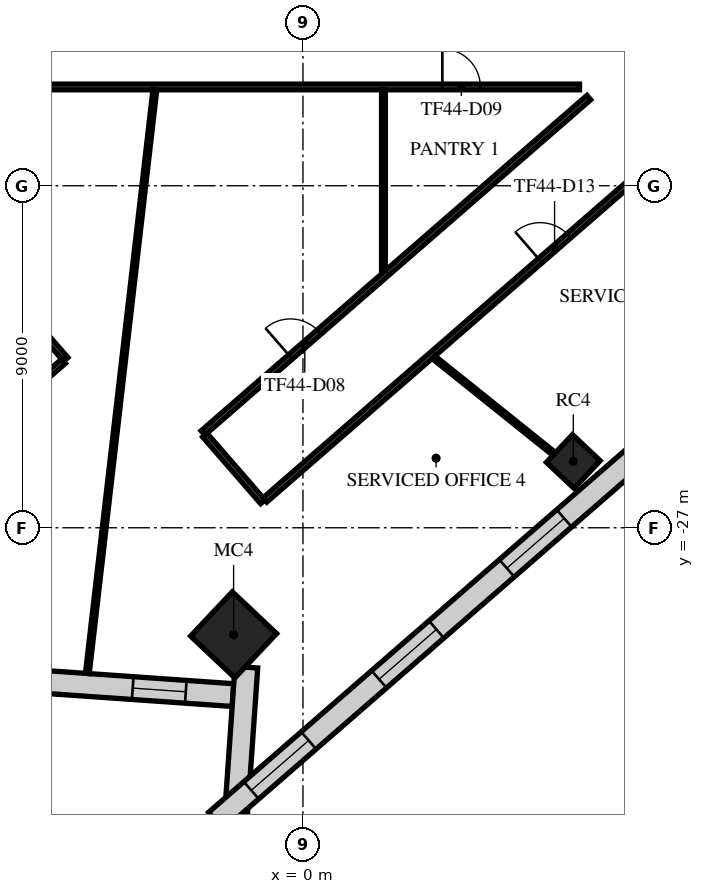
"""IFC4 building model, lengths in metres.
Left out: names, types, materials, properties, quantities, classifications, styles, units other than length and angle.
Written with IfcOpenShell. Run it as: python <this file> out.ifc"""

import sys

from ifc_helpers import new_model, si_unit, direction, frame, frame_2d, origin, origin_2d, place, context, subcontext, project, spatial, rectangle, extrude, element, fill, save


model = new_model("IFC4")
c1 = context("Model", 3, precision=1e-05, world=origin(), true_north=direction((0.0, 1.0)))
c2 = subcontext(c1, "Body", "Model", "MODEL_VIEW")
j1 = project(units=[si_unit("LENGTHUNIT", "METRE"), si_unit("PLANEANGLEUNIT", "RADIAN")], contexts=[c1])
p1 = place(None, origin())
s1 = spatial("IfcSite", under=j1, at=p1, CompositionType="ELEMENT")
p2 = place(p1, origin())
s2 = spatial("IfcBuilding", under=s1, at=p2, CompositionType="ELEMENT")
p3 = place(p2, frame((0.0, 0.0, 193.3)))
s3 = spatial("IfcBuildingStorey", under=s2, at=p3, CompositionType="ELEMENT", Elevation=193.3)
p4 = place(p3, frame((-1.825, -29.818, 0.0), z_axis=(0.0, 0.0, 1.0), x_axis=(0.685916152371, 0.727680583715, 0.0)))
e1 = element("IfcColumn", 1, at=p4, inside=s3, PredefinedType="COLUMN", context=c2, shape_type="SweptSolid", body=[
    extrude(rectangle(XDim=1.6, YDim=1.6, at=origin_2d()), origin(), (0.0, 0.0, 1.0), 4.0),
])
p5 = place(p3, frame((7.113, -25.257, 0.0), z_axis=(0.0, 0.0, 1.0), x_axis=(0.685916152371, 0.727680583715, 0.0)))
e2 = element("IfcColumn", 2, at=p5, inside=s3, PredefinedType="COLUMN", context=c2, shape_type="SweptSolid", body=[
    extrude(rectangle(XDim=1.0, YDim=1.0, at=origin_2d()), origin(), (0.0, 0.0, 1.0), 4.0),
])
p6 = place(p3, frame((-9.601, -30.861, 0.0), z_axis=(0.0, 0.0, 1.0), x_axis=(0.997564801601, -0.069745728239, 0.0)))
e3 = element("IfcWall", 3, at=p6, inside=s3, PredefinedType="STANDARD", context=c2, shape_type="SweptSolid", body=[
    extrude(rectangle(XDim=7.778, YDim=0.6, at=frame_2d((3.889, 0.0))), origin(), (0.0, 0.0, 1.0), 3.62),
])
p7 = place(p6, frame((1.244, 0.0, 0.9)))
e4 = element("IfcOpeningElement", 4, at=p7, cuts=e3, PredefinedType="OPENING", context=c2, shape_type="SweptSolid", body=[
    extrude(rectangle(XDim=1.4, YDim=2.1, at=frame_2d((0.7, 1.05))), frame((0.0, 0.31, 0.0), z_axis=(0.0, -1.0, 0.0), x_axis=(1.0, 0.0, 0.0)), (0.0, 0.0, 1.0), 0.62),
])
p8 = place(p6, frame((5.134, 0.0, 0.9)))
e5 = element("IfcOpeningElement", 5, at=p8, cuts=e3, PredefinedType="OPENING", context=c2, shape_type="SweptSolid", body=[
    extrude(rectangle(XDim=1.4, YDim=2.1, at=frame_2d((0.7, 1.05))), frame((0.0, 0.31, 0.0), z_axis=(0.0, -1.0, 0.0), x_axis=(1.0, 0.0, 0.0)), (0.0, 0.0, 1.0), 0.62),
])
p9 = place(p3, frame((-1.49, -30.669, 0.0), z_axis=(0.0, 0.0, 1.0), x_axis=(-0.069722992179, -0.997566390954, 0.0)))
e6 = element("IfcWall", 6, at=p9, inside=s3, PredefinedType="STANDARD", context=c2, shape_type="SweptSolid", body=[
    extrude(rectangle(XDim=4.303, YDim=0.6, at=frame_2d((2.152, 0.0))), origin(), (0.0, 0.0, 1.0), 3.62),
])
p10 = place(p3, frame((-2.286, -34.715, 0.0), z_axis=(0.0, 0.0, 1.0), x_axis=(0.754708272811, 0.656060532993, 0.0)))
e7 = element("IfcWall", 7, at=p10, inside=s3, PredefinedType="STANDARD", context=c2, shape_type="SweptSolid", body=[
    extrude(rectangle(XDim=49.0, YDim=0.6, at=frame_2d((24.5, 0.0))), origin(), (0.0, 0.0, 1.0), 3.62),
])
p11 = place(p10, frame((1.227, 0.0, 0.9)))
e8 = element("IfcOpeningElement", 8, at=p11, cuts=e7, PredefinedType="OPENING", context=c2, shape_type="SweptSolid", body=[
    extrude(rectangle(XDim=2.0, YDim=2.1, at=frame_2d((1.0, 1.05))), frame((0.0, 0.31, 0.0), z_axis=(0.0, -1.0, 0.0), x_axis=(1.0, 0.0, 0.0)), (0.0, 0.0, 1.0), 0.62),
])
p12 = place(p10, frame((5.682, 0.0, 0.9)))
e9 = element("IfcOpeningElement", 9, at=p12, cuts=e7, PredefinedType="OPENING", context=c2, shape_type="SweptSolid", body=[
    extrude(rectangle(XDim=2.0, YDim=2.1, at=frame_2d((1.0, 1.05))), frame((0.0, 0.31, 0.0), z_axis=(0.0, -1.0, 0.0), x_axis=(1.0, 0.0, 0.0)), (0.0, 0.0, 1.0), 0.62),
])
p13 = place(p10, frame((10.136, 0.0, 0.9)))
e10 = element("IfcOpeningElement", 10, at=p13, cuts=e7, PredefinedType="OPENING", context=c2, shape_type="SweptSolid", body=[
    extrude(rectangle(XDim=2.0, YDim=2.1, at=frame_2d((1.0, 1.05))), frame((0.0, 0.31, 0.0), z_axis=(0.0, -1.0, 0.0), x_axis=(1.0, 0.0, 0.0)), (0.0, 0.0, 1.0), 0.62),
])
p14 = place(p10, frame((14.591, 0.0, 0.9)))
e11 = element("IfcOpeningElement", 11, at=p14, cuts=e7, PredefinedType="OPENING", context=c2, shape_type="SweptSolid", body=[
    extrude(rectangle(XDim=2.0, YDim=2.1, at=frame_2d((1.0, 1.05))), frame((0.0, 0.31, 0.0), z_axis=(0.0, -1.0, 0.0), x_axis=(1.0, 0.0, 0.0)), (0.0, 0.0, 1.0), 0.62),
])
p15 = place(p10, frame((19.045, 0.0, 0.9)))
e12 = element("IfcOpeningElement", 12, at=p15, cuts=e7, PredefinedType="OPENING", context=c2, shape_type="SweptSolid", body=[
    extrude(rectangle(XDim=2.0, YDim=2.1, at=frame_2d((1.0, 1.05))), frame((0.0, 0.31, 0.0), z_axis=(0.0, -1.0, 0.0), x_axis=(1.0, 0.0, 0.0)), (0.0, 0.0, 1.0), 0.62),
])
p16 = place(p10, frame((23.5, 0.0, 0.9)))
e13 = element("IfcOpeningElement", 13, at=p16, cuts=e7, PredefinedType="OPENING", context=c2, shape_type="SweptSolid", body=[
    extrude(rectangle(XDim=2.0, YDim=2.1, at=frame_2d((1.0, 1.05))), frame((0.0, 0.31, 0.0), z_axis=(0.0, -1.0, 0.0), x_axis=(1.0, 0.0, 0.0)), (0.0, 0.0, 1.0), 0.62),
])
p17 = place(p10, frame((27.955, 0.0, 0.9)))
e14 = element("IfcOpeningElement", 14, at=p17, cuts=e7, PredefinedType="OPENING", context=c2, shape_type="SweptSolid", body=[
    extrude(rectangle(XDim=2.0, YDim=2.1, at=frame_2d((1.0, 1.05))), frame((0.0, 0.31, 0.0), z_axis=(0.0, -1.0, 0.0), x_axis=(1.0, 0.0, 0.0)), (0.0, 0.0, 1.0), 0.62),
])
p18 = place(p10, frame((32.409, 0.0, 0.9)))
e15 = element("IfcOpeningElement", 15, at=p18, cuts=e7, PredefinedType="OPENING", context=c2, shape_type="SweptSolid", body=[
    extrude(rectangle(XDim=2.0, YDim=2.1, at=frame_2d((1.0, 1.05))), frame((0.0, 0.31, 0.0), z_axis=(0.0, -1.0, 0.0), x_axis=(1.0, 0.0, 0.0)), (0.0, 0.0, 1.0), 0.62),
])
p19 = place(p10, frame((36.864, 0.0, 0.9)))
e16 = element("IfcOpeningElement", 16, at=p19, cuts=e7, PredefinedType="OPENING", context=c2, shape_type="SweptSolid", body=[
    extrude(rectangle(XDim=2.0, YDim=2.1, at=frame_2d((1.0, 1.05))), frame((0.0, 0.31, 0.0), z_axis=(0.0, -1.0, 0.0), x_axis=(1.0, 0.0, 0.0)), (0.0, 0.0, 1.0), 0.62),
])
p20 = place(p10, frame((41.318, 0.0, 0.9)))
e17 = element("IfcOpeningElement", 17, at=p20, cuts=e7, PredefinedType="OPENING", context=c2, shape_type="SweptSolid", body=[
    extrude(rectangle(XDim=2.0, YDim=2.1, at=frame_2d((1.0, 1.05))), frame((0.0, 0.31, 0.0), z_axis=(0.0, -1.0, 0.0), x_axis=(1.0, 0.0, 0.0)), (0.0, 0.0, 1.0), 0.62),
])
p21 = place(p10, frame((45.773, 0.0, 0.9)))
e18 = element("IfcOpeningElement", 18, at=p21, cuts=e7, PredefinedType="OPENING", context=c2, shape_type="SweptSolid", body=[
    extrude(rectangle(XDim=2.0, YDim=2.1, at=frame_2d((1.0, 1.05))), frame((0.0, 0.31, 0.0), z_axis=(0.0, -1.0, 0.0), x_axis=(1.0, 0.0, 0.0)), (0.0, 0.0, 1.0), 0.62),
])
p22 = place(p3, frame((-11.705, -16.285, 0.0), z_axis=(0.0, 0.0, 1.0), x_axis=(0.656018266208, -0.754745012837, 0.0)))
e19 = element("IfcWall", 19, at=p22, inside=s3, PredefinedType="PARTITIONING", context=c2, shape_type="SweptSolid", body=[
    extrude(rectangle(XDim=8.326, YDim=0.15, at=frame_2d((4.163, 0.0))), origin(), (0.0, 0.0, 1.0), 3.17),
])
p23 = place(p3, frame((-10.486, -15.4, 0.0), z_axis=(0.0, 0.0, 1.0), x_axis=(1.0, 0.0, 0.0)))
e20 = element("IfcWall", 20, at=p23, inside=s3, PredefinedType="PARTITIONING", context=c2, shape_type="SweptSolid", body=[
    extrude(rectangle(XDim=17.763, YDim=0.15, at=frame_2d((8.882, 0.0))), origin(), (0.0, 0.0, 1.0), 3.17),
])
p24 = place(p23, frame((14.154, 0.0, 0.0)))
e21 = element("IfcOpeningElement", 21, at=p24, cuts=e20, PredefinedType="OPENING", context=c2, shape_type="SweptSolid", body=[
    extrude(rectangle(XDim=1.0, YDim=2.1, at=frame_2d((0.5, 1.05))), frame((0.0, 0.085, 0.0), z_axis=(0.0, -1.0, 0.0), x_axis=(1.0, 0.0, 0.0)), (0.0, 0.0, 1.0), 0.17),
])
p25 = place(p3, frame((-7.997, -24.095, 0.0), z_axis=(0.0, 0.0, 1.0), x_axis=(0.754549456123, 0.656243185308, 0.0)))
e22 = element("IfcWall", 22, at=p25, inside=s3, PredefinedType="PARTITIONING", context=c2, shape_type="SweptSolid", body=[
    extrude(rectangle(XDim=2.25, YDim=0.15, at=frame_2d((1.125, 0.0))), origin(), (0.0, 0.0, 1.0), 3.17),
])
p26 = place(p3, frame((-2.631, -24.505, 0.0), z_axis=(0.0, 0.0, 1.0), x_axis=(0.754714526528, 0.656053338874, 0.0)))
e23 = element("IfcWall", 23, at=p26, inside=s3, PredefinedType="PARTITIONING", context=c2, shape_type="SweptSolid", body=[
    extrude(rectangle(XDim=13.452, YDim=0.15, at=frame_2d((6.726, 0.0))), origin(), (0.0, 0.0, 1.0), 3.17),
])
p27 = place(p26, frame((3.05, 0.0, 0.0)))
e24 = element("IfcOpeningElement", 24, at=p27, cuts=e23, PredefinedType="OPENING", context=c2, shape_type="SweptSolid", body=[
    extrude(rectangle(XDim=1.0, YDim=2.1, at=frame_2d((0.5, 1.05))), frame((0.0, 0.085, 0.0), z_axis=(0.0, -1.0, 0.0), x_axis=(1.0, 0.0, 0.0)), (0.0, 0.0, 1.0), 0.17),
])
p28 = place(p3, frame((-2.582, -24.562, 0.0), z_axis=(0.0, 0.0, 1.0), x_axis=(0.655809509093, -0.754926412164, 0.0)))
e25 = element("IfcWall", 25, at=p28, inside=s3, PredefinedType="PARTITIONING", context=c2, shape_type="SweptSolid", body=[
    extrude(rectangle(XDim=2.325, YDim=0.15, at=frame_2d((1.163, 0.0))), origin(), (0.0, 0.0, 1.0), 3.17),
])
p29 = place(p3, frame((-1.0, -26.268, 0.0), z_axis=(0.0, 0.0, 1.0), x_axis=(0.754711356604, 0.656056985492, 0.0)))
e26 = element("IfcWall", 26, at=p29, inside=s3, PredefinedType="PARTITIONING", context=c2, shape_type="SweptSolid", body=[
    extrude(rectangle(XDim=36.052, YDim=0.15, at=frame_2d((18.026, 0.0))), origin(), (0.0, 0.0, 1.0), 3.17),
])
p30 = place(p29, frame((9.598, 0.0, 0.0)))
e27 = element("IfcOpeningElement", 27, at=p30, cuts=e26, PredefinedType="OPENING", context=c2, shape_type="SweptSolid", body=[
    extrude(rectangle(XDim=1.0, YDim=2.1, at=frame_2d((0.5, 1.05))), frame((0.0, 0.085, 0.0), z_axis=(0.0, -1.0, 0.0), x_axis=(1.0, 0.0, 0.0)), (0.0, 0.0, 1.0), 0.17),
])
p31 = place(p29, frame((20.957, 0.0, 0.0)))
e28 = element("IfcOpeningElement", 28, at=p31, cuts=e26, PredefinedType="OPENING", context=c2, shape_type="SweptSolid", body=[
    extrude(rectangle(XDim=1.0, YDim=2.1, at=frame_2d((0.5, 1.05))), frame((0.0, 0.085, 0.0), z_axis=(0.0, -1.0, 0.0), x_axis=(1.0, 0.0, 0.0)), (0.0, 0.0, 1.0), 0.17),
])
p32 = place(p29, frame((27.87, 0.0, 0.0)))
e29 = element("IfcOpeningElement", 29, at=p32, cuts=e26, PredefinedType="OPENING", context=c2, shape_type="SweptSolid", body=[
    extrude(rectangle(XDim=1.8, YDim=2.1, at=frame_2d((0.9, 1.05))), frame((0.0, 0.085, 0.0), z_axis=(0.0, -1.0, 0.0), x_axis=(1.0, 0.0, 0.0)), (0.0, 0.0, 1.0), 0.17),
])
p33 = place(p3, frame((-5.674, -30.833, 0.0), z_axis=(0.0, 0.0, 1.0), x_axis=(0.114957483757, 0.993370412751, 0.0)))
e30 = element("IfcWall", 30, at=p33, inside=s3, PredefinedType="PARTITIONING", context=c2, shape_type="SweptSolid", body=[
    extrude(rectangle(XDim=15.455, YDim=0.1, at=frame_2d((7.727, 0.0))), origin(), (0.0, 0.0, 1.0), 3.62),
])
p34 = place(p3, frame((2.118, -20.234, 0.0), z_axis=(0.0, 0.0, 1.0), x_axis=(0.0, 1.0, 0.0)))
e31 = element("IfcWall", 31, at=p34, inside=s3, PredefinedType="PARTITIONING", context=c2, shape_type="SweptSolid", body=[
    extrude(rectangle(XDim=4.759, YDim=0.1, at=frame_2d((2.379, 0.0))), origin(), (0.0, 0.0, 1.0), 3.17),
])
p35 = place(p3, frame((3.441, -22.517, 0.0), z_axis=(0.0, 0.0, 1.0), x_axis=(0.780129784841, -0.62561770979, 0.0)))
e32 = element("IfcWall", 32, at=p35, inside=s3, PredefinedType="PARTITIONING", context=c2, shape_type="SweptSolid", body=[
    extrude(rectangle(XDim=4.064, YDim=0.1, at=frame_2d((2.032, 0.0))), origin(), (0.0, 0.0, 1.0), 3.17),
])
p36 = place(p8, origin())
e33 = element("IfcWindow", 33, at=p36, inside=s3, PartitioningType="SINGLE_PANEL", PredefinedType="WINDOW", context=c2, shape_type="SweptSolid", body=[
    extrude(rectangle(XDim=1.4, YDim=2.1, at=frame_2d((0.7, 1.05))), frame((0.0, 0.03, 0.0), z_axis=(0.0, -1.0, 0.0), x_axis=(1.0, 0.0, 0.0)), (0.0, 0.0, 1.0), 0.06),
])
fill(e5, e33)
p37 = place(p11, origin())
e34 = element("IfcWindow", 34, at=p37, inside=s3, PartitioningType="SINGLE_PANEL", PredefinedType="WINDOW", context=c2, shape_type="SweptSolid", body=[
    extrude(rectangle(XDim=2.0, YDim=2.1, at=frame_2d((1.0, 1.05))), frame((0.0, 0.03, 0.0), z_axis=(0.0, -1.0, 0.0), x_axis=(1.0, 0.0, 0.0)), (0.0, 0.0, 1.0), 0.06),
])
fill(e8, e34)
p38 = place(p12, origin())
e35 = element("IfcWindow", 35, at=p38, inside=s3, PartitioningType="SINGLE_PANEL", PredefinedType="WINDOW", context=c2, shape_type="SweptSolid", body=[
    extrude(rectangle(XDim=2.0, YDim=2.1, at=frame_2d((1.0, 1.05))), frame((0.0, 0.03, 0.0), z_axis=(0.0, -1.0, 0.0), x_axis=(1.0, 0.0, 0.0)), (0.0, 0.0, 1.0), 0.06),
])
fill(e9, e35)
p39 = place(p13, origin())
e36 = element("IfcWindow", 36, at=p39, inside=s3, PartitioningType="SINGLE_PANEL", PredefinedType="WINDOW", context=c2, shape_type="SweptSolid", body=[
    extrude(rectangle(XDim=2.0, YDim=2.1, at=frame_2d((1.0, 1.05))), frame((0.0, 0.03, 0.0), z_axis=(0.0, -1.0, 0.0), x_axis=(1.0, 0.0, 0.0)), (0.0, 0.0, 1.0), 0.06),
])
fill(e10, e36)
p40 = place(p27, origin())
e37 = element("IfcDoor", 37, at=p40, inside=s3, OperationType="SINGLE_SWING_RIGHT", PredefinedType="DOOR", context=c2, shape_type="SweptSolid", body=[
    extrude(rectangle(XDim=1.0, YDim=2.1, at=frame_2d((0.5, 1.05))), frame((0.0, 0.025, 0.0), z_axis=(0.0, -1.0, 0.0), x_axis=(1.0, 0.0, 0.0)), (0.0, 0.0, 1.0), 0.05),
])
fill(e24, e37)
p41 = place(p24, frame((1.0, 0.0, 0.0), z_axis=(0.0, 0.0, 1.0), x_axis=(-1.0, 0.0, 0.0)))
e38 = element("IfcDoor", 38, at=p41, inside=s3, OperationType="SINGLE_SWING_LEFT", PredefinedType="DOOR", context=c2, shape_type="SweptSolid", body=[
    extrude(rectangle(XDim=1.0, YDim=2.1, at=frame_2d((0.5, 1.05))), frame((0.0, 0.025, 0.0), z_axis=(0.0, -1.0, 0.0), x_axis=(1.0, 0.0, 0.0)), (0.0, 0.0, 1.0), 0.05),
])
fill(e21, e38)
p42 = place(p30, frame((1.0, 0.0, 0.0), z_axis=(0.0, 0.0, 1.0), x_axis=(-1.0, 0.0, 0.0)))
e39 = element("IfcDoor", 39, at=p42, inside=s3, OperationType="SINGLE_SWING_LEFT", PredefinedType="DOOR", context=c2, shape_type="SweptSolid", body=[
    extrude(rectangle(XDim=1.0, YDim=2.1, at=frame_2d((0.5, 1.05))), frame((0.0, 0.025, 0.0), z_axis=(0.0, -1.0, 0.0), x_axis=(1.0, 0.0, 0.0)), (0.0, 0.0, 1.0), 0.05),
])
fill(e27, e39)
save(model, sys.argv[1])
